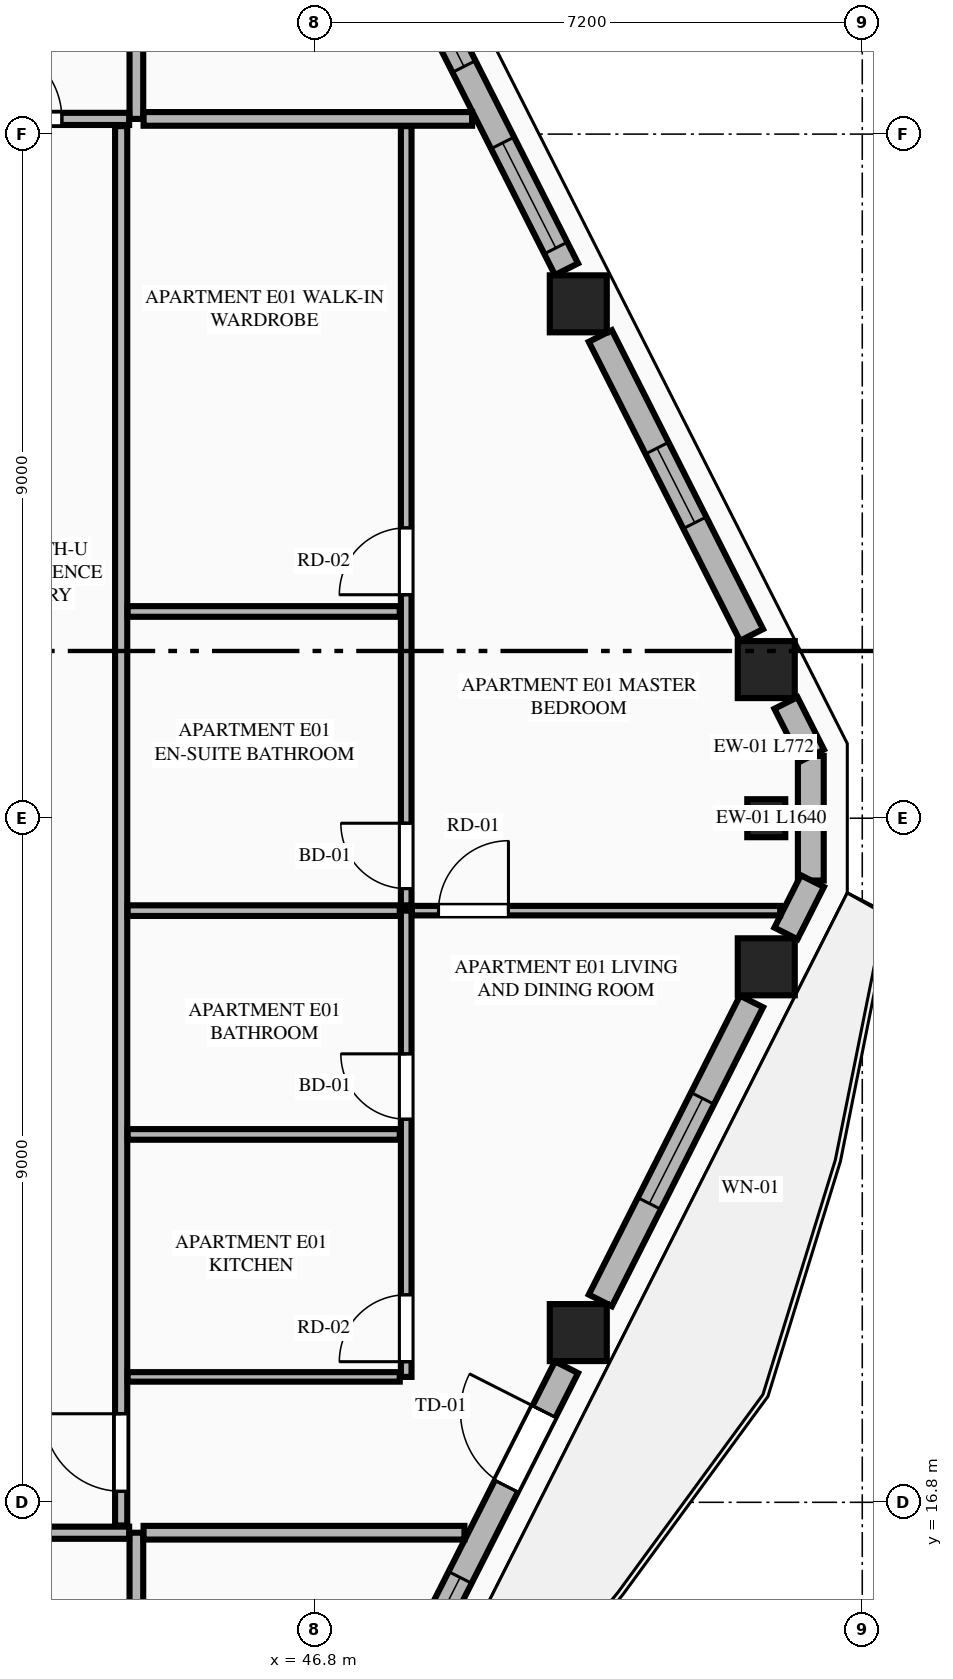
"""IFC4 building model, lengths in metres.
Left out: names, types, materials, properties, quantities, classifications, styles, units other than length and angle.
Written with IfcOpenShell. Run it as: python <this file> out.ifc"""

import sys

from ifc_helpers import new_model, si_unit, direction, frame, frame_2d, origin, origin_2d, place, context, subcontext, project, spatial, rectangle, extrude, element, fill, save


model = new_model("IFC4")
c1 = context("Model", 3, precision=1e-05, world=origin(), true_north=direction((0.0, 1.0)))
c2 = subcontext(c1, "Body", "Model", "MODEL_VIEW")
j1 = project(units=[si_unit("LENGTHUNIT", "METRE"), si_unit("PLANEANGLEUNIT", "RADIAN")], contexts=[c1])
p1 = place(None, origin())
s1 = spatial("IfcSite", under=j1, at=p1, CompositionType="ELEMENT")
p2 = place(p1, origin())
s2 = spatial("IfcBuilding", under=s1, at=p2, CompositionType="ELEMENT")
p3 = place(p2, frame((0.0, 0.0, 234.3)))
s3 = spatial("IfcBuildingStorey", under=s2, at=p3, CompositionType="ELEMENT", Elevation=234.3)
for number, where, z_axis, x_axis in (
    (1, (50.264, 19.033, 0.0), (0.0, 0.0, 1.0), (1.0, 0.0, 0.0)),
    (2, (52.737, 23.845, 0.0), (0.0, 0.0, 1.0), (1.0, 0.0, 0.0)),
    (3, (52.737, 27.755, 0.0), (0.0, 0.0, 1.0), (1.0, 0.0, 0.0)),
    (4, (50.264, 32.567, 0.0), (0.0, 0.0, 1.0), (1.0, 0.0, 0.0)),
):
    element("IfcColumn", number, at=place(p3, frame(where, z_axis=z_axis, x_axis=x_axis)), inside=s3, PredefinedType="COLUMN", context=c2, shape_type="SweptSolid", body=[
        extrude(rectangle(XDim=0.75, YDim=0.75, at=origin_2d()), origin(), (0.0, 0.0, 1.0), 3.65),
    ])
p4 = place(p3, frame((52.737, 25.8, 0.0), z_axis=(0.0, 0.0, 1.0), x_axis=(0.0, 1.0, 0.0)))
e5 = element("IfcColumn", 5, at=p4, inside=s3, PredefinedType="PILASTER", context=c2, shape_type="SweptSolid", body=[
    extrude(rectangle(XDim=0.5, YDim=0.35, at=origin_2d()), origin(), (0.0, 0.0, 1.0), 3.65),
])
p5 = place(p3, frame((53.323, 24.98, 0.0), z_axis=(0.0, 0.0, 1.0), x_axis=(0.0, 1.0, 0.0)))
e6 = element("IfcWall", 6, at=p5, inside=s3, PredefinedType="STANDARD", context=c2, shape_type="SweptSolid", body=[
    extrude(rectangle(XDim=1.64, YDim=0.34, at=frame_2d((0.82, 0.0))), origin(), (0.0, 0.0, 1.0), 3.45),
])
p6 = place(p3, frame((48.032, 14.473, 0.0), z_axis=(0.0, 0.0, 1.0), x_axis=(0.451539564999, 0.892251097641, 0.0)))
e7 = element("IfcWall", 7, at=p6, inside=s3, PredefinedType="STANDARD", context=c2, shape_type="SweptSolid", body=[
    extrude(rectangle(XDim=4.6, YDim=0.34, at=frame_2d((2.3, 0.0))), origin(), (0.0, 0.0, 1.0), 2.983),
])
p7 = place(p6, frame((2.846, 0.0, 0.0)))
e8 = element("IfcOpeningElement", 8, at=p7, cuts=e7, PredefinedType="OPENING", context=c2, shape_type="SweptSolid", body=[
    extrude(rectangle(XDim=1.1, YDim=2.25, at=frame_2d((0.55, 1.125))), frame((0.0, 0.18, 0.0), z_axis=(0.0, -1.0, 0.0), x_axis=(1.0, 0.0, 0.0)), (0.0, 0.0, 1.0), 0.36),
])
p8 = place(p6, frame((0.4, 0.0, 0.75)))
e9 = element("IfcOpeningElement", 9, at=p8, cuts=e7, PredefinedType="OPENING", context=c2, shape_type="SweptSolid", body=[
    extrude(rectangle(XDim=1.1, YDim=2.0, at=frame_2d((0.55, 1.0))), frame((0.0, 0.18, 0.0), z_axis=(0.0, -1.0, 0.0), x_axis=(1.0, 0.0, 0.0)), (0.0, 0.0, 1.0), 0.36),
])
p9 = place(p3, frame((50.554, 19.456, 0.0), z_axis=(0.0, 0.0, 1.0), x_axis=(0.45130817501, 0.892368158984, 0.0)))
e10 = element("IfcWall", 10, at=p9, inside=s3, PredefinedType="STANDARD", context=c2, shape_type="SweptSolid", body=[
    extrude(rectangle(XDim=4.407, YDim=0.34, at=frame_2d((2.204, 0.0))), origin(), (0.0, 0.0, 1.0), 2.983),
])
p10 = place(p9, frame((1.429, 0.0, 0.75)))
e11 = element("IfcOpeningElement", 11, at=p10, cuts=e10, PredefinedType="OPENING", context=c2, shape_type="SweptSolid", body=[
    extrude(rectangle(XDim=1.55, YDim=2.05, at=frame_2d((0.775, 1.025))), frame((0.0, 0.18, 0.0), z_axis=(0.0, -1.0, 0.0), x_axis=(1.0, 0.0, 0.0)), (0.0, 0.0, 1.0), 0.36),
])
for number, where, z_axis, x_axis in (
    (12, (52.996, 24.284, 0.0), (0.0, 0.0, 1.0), (0.451, 0.893, 0.0)),
    (13, (53.344, 26.627, 0.0), (0.0, 0.0, 1.0), (-0.451, 0.893, 0.0)),
):
    element("IfcWall", number, at=place(p3, frame(where, z_axis=z_axis, x_axis=x_axis)), inside=s3, PredefinedType="STANDARD", context=c2, shape_type="SweptSolid", body=[
        extrude(rectangle(XDim=0.772, YDim=0.34, at=frame_2d((0.386, 0.0))), origin(), (0.0, 0.0, 1.0), 3.45),
    ])
p11 = place(p3, frame((52.543, 28.211, 0.0), z_axis=(0.0, 0.0, 1.0), x_axis=(-0.451285866323, 0.892379441077, 0.0)))
e14 = element("IfcWall", 14, at=p11, inside=s3, PredefinedType="STANDARD", context=c2, shape_type="SweptSolid", body=[
    extrude(rectangle(XDim=4.407, YDim=0.34, at=frame_2d((2.204, 0.0))), origin(), (0.0, 0.0, 1.0), 2.983),
])
p12 = place(p11, frame((1.654, 0.0, 0.75)))
e15 = element("IfcOpeningElement", 15, at=p12, cuts=e14, PredefinedType="OPENING", context=c2, shape_type="SweptSolid", body=[
    extrude(rectangle(XDim=1.1, YDim=2.0, at=frame_2d((0.55, 1.0))), frame((0.0, 0.18, 0.0), z_axis=(0.0, -1.0, 0.0), x_axis=(1.0, 0.0, 0.0)), (0.0, 0.0, 1.0), 0.36),
])
p13 = place(p3, frame((50.109, 33.023, 0.0), z_axis=(0.0, 0.0, 1.0), x_axis=(-0.451539564999, 0.892251097641, 0.0)))
e16 = element("IfcWall", 16, at=p13, inside=s3, PredefinedType="STANDARD", context=c2, shape_type="SweptSolid", body=[
    extrude(rectangle(XDim=4.6, YDim=0.34, at=frame_2d((2.3, 0.0))), origin(), (0.0, 0.0, 1.0), 2.983),
])
p14 = place(p13, frame((0.312, 0.0, 0.75)))
e17 = element("IfcOpeningElement", 17, at=p14, cuts=e16, PredefinedType="OPENING", context=c2, shape_type="SweptSolid", body=[
    extrude(rectangle(XDim=1.55, YDim=2.05, at=frame_2d((0.775, 1.025))), frame((0.0, 0.18, 0.0), z_axis=(0.0, -1.0, 0.0), x_axis=(1.0, 0.0, 0.0)), (0.0, 0.0, 1.0), 0.36),
])
p15 = place(p13, frame((2.988, 0.0, 0.75)))
e18 = element("IfcOpeningElement", 18, at=p15, cuts=e16, PredefinedType="OPENING", context=c2, shape_type="SweptSolid", body=[
    extrude(rectangle(XDim=1.1, YDim=2.0, at=frame_2d((0.55, 1.0))), frame((0.0, 0.18, 0.0), z_axis=(0.0, -1.0, 0.0), x_axis=(1.0, 0.0, 0.0)), (0.0, 0.0, 1.0), 0.36),
])
p16 = place(p3, frame((44.45, 8.119, 0.0), z_axis=(0.0, 0.0, 1.0), x_axis=(0.0, 1.0, 0.0)))
e19 = element("IfcWall", 19, at=p16, inside=s3, PredefinedType="PARTITIONING", context=c2, shape_type="SweptSolid", body=[
    extrude(rectangle(XDim=8.281, YDim=0.18, at=frame_2d((4.141, 0.0))), origin(), (0.0, 0.0, 1.0), 3.45),
])
p17 = place(p3, frame((29.241, 16.4, 0.0), z_axis=(0.0, 0.0, 1.0), x_axis=(1.0, 0.0, 0.0)))
e20 = element("IfcWall", 20, at=p17, inside=s3, PredefinedType="PARTITIONING", context=c2, shape_type="SweptSolid", body=[
    extrude(rectangle(XDim=15.114, YDim=0.16, at=frame_2d((7.557, 0.0))), origin(), (0.0, 0.0, 1.0), 3.45),
])
p18 = place(p17, frame((12.909, 0.0, 0.0)))
e21 = element("IfcOpeningElement", 21, at=p18, cuts=e20, PredefinedType="OPENING", context=c2, shape_type="SweptSolid", body=[
    extrude(rectangle(XDim=1.02, YDim=2.25, at=frame_2d((0.51, 1.125))), frame((0.0, 0.09, 0.0), z_axis=(0.0, -1.0, 0.0), x_axis=(1.0, 0.0, 0.0)), (0.0, 0.0, 1.0), 0.18),
])
p19 = place(p3, frame((44.45, 35.0, 0.0), z_axis=(0.0, 0.0, 1.0), x_axis=(0.0, 1.0, 0.0)))
e22 = element("IfcWall", 22, at=p19, inside=s3, PredefinedType="PARTITIONING", context=c2, shape_type="SweptSolid", body=[
    extrude(rectangle(XDim=8.481, YDim=0.18, at=frame_2d((4.24, 0.0))), origin(), (0.0, 0.0, 1.0), 3.45),
])
p20 = place(p3, frame((29.241, 35.0, 0.0), z_axis=(0.0, 0.0, 1.0), x_axis=(1.0, 0.0, 0.0)))
e23 = element("IfcWall", 23, at=p20, inside=s3, PredefinedType="PARTITIONING", context=c2, shape_type="SweptSolid", body=[
    extrude(rectangle(XDim=15.114, YDim=0.16, at=frame_2d((7.557, 0.0))), origin(), (0.0, 0.0, 1.0), 3.45),
])
p21 = place(p20, frame((13.209, 0.0, 0.0)))
e24 = element("IfcOpeningElement", 24, at=p21, cuts=e23, PredefinedType="OPENING", context=c2, shape_type="SweptSolid", body=[
    extrude(rectangle(XDim=1.02, YDim=2.25, at=frame_2d((0.51, 1.125))), frame((0.0, 0.09, 0.0), z_axis=(0.0, -1.0, 0.0), x_axis=(1.0, 0.0, 0.0)), (0.0, 0.0, 1.0), 0.18),
])
p22 = place(p3, frame((44.545, 16.4, 0.0), z_axis=(0.0, 0.0, 1.0), x_axis=(1.0, 0.0, 0.0)))
e25 = element("IfcWall", 25, at=p22, inside=s3, PredefinedType="PARTITIONING", context=c2, shape_type="SweptSolid", body=[
    extrude(rectangle(XDim=4.221, YDim=0.18, at=frame_2d((2.111, 0.0))), origin(), (0.0, 0.0, 1.0), 3.45),
])
p23 = place(p3, frame((44.545, 35.0, 0.0), z_axis=(0.0, 0.0, 1.0), x_axis=(1.0, 0.0, 0.0)))
e26 = element("IfcWall", 26, at=p23, inside=s3, PredefinedType="PARTITIONING", context=c2, shape_type="SweptSolid", body=[
    extrude(rectangle(XDim=4.322, YDim=0.18, at=frame_2d((2.161, 0.0))), origin(), (0.0, 0.0, 1.0), 3.45),
])
p24 = place(p3, frame((44.25, 16.495, 0.0), z_axis=(0.0, 0.0, 1.0), x_axis=(0.0, 1.0, 0.0)))
e27 = element("IfcWall", 27, at=p24, inside=s3, PredefinedType="PARTITIONING", context=c2, shape_type="SweptSolid", body=[
    extrude(rectangle(XDim=18.41, YDim=0.16, at=frame_2d((9.205, 0.0))), origin(), (0.0, 0.0, 1.0), 3.137),
])
p25 = place(p24, frame((0.45, 0.0, 0.0)))
e28 = element("IfcOpeningElement", 28, at=p25, cuts=e27, PredefinedType="OPENING", context=c2, shape_type="SweptSolid", body=[
    extrude(rectangle(XDim=1.02, YDim=2.25, at=frame_2d((0.51, 1.125))), frame((0.0, 0.09, 0.0), z_axis=(0.0, -1.0, 0.0), x_axis=(1.0, 0.0, 0.0)), (0.0, 0.0, 1.0), 0.18),
])
p26 = place(p3, frame((44.335, 18.45, 0.0), z_axis=(0.0, 0.0, 1.0), x_axis=(1.0, 0.0, 0.0)))
e29 = element("IfcWall", 29, at=p26, inside=s3, PredefinedType="PARTITIONING", context=c2, shape_type="SweptSolid", body=[
    extrude(rectangle(XDim=3.58, YDim=0.125, at=frame_2d((1.79, 0.0))), origin(), (0.0, 0.0, 1.0), 3.45),
])
p27 = place(p3, frame((48.0, 18.45, 0.0), z_axis=(0.0, 0.0, 1.0), x_axis=(0.0, 1.0, 0.0)))
e30 = element("IfcWall", 30, at=p27, inside=s3, PredefinedType="PLUMBINGWALL", context=c2, shape_type="SweptSolid", body=[
    extrude(rectangle(XDim=6.134, YDim=0.14, at=frame_2d((3.067, 0.0))), origin(), (0.0, 0.0, 1.0), 3.45),
])
p28 = place(p27, frame((0.2, 0.0, 0.0)))
e31 = element("IfcOpeningElement", 31, at=p28, cuts=e30, PredefinedType="OPENING", context=c2, shape_type="SweptSolid", body=[
    extrude(rectangle(XDim=0.88, YDim=2.15, at=frame_2d((0.44, 1.075))), frame((0.0, 0.08, 0.0), z_axis=(0.0, -1.0, 0.0), x_axis=(1.0, 0.0, 0.0)), (0.0, 0.0, 1.0), 0.16),
])
p29 = place(p27, frame((3.39, 0.0, 0.0)))
e32 = element("IfcOpeningElement", 32, at=p29, cuts=e30, PredefinedType="OPENING", context=c2, shape_type="SweptSolid", body=[
    extrude(rectangle(XDim=0.86, YDim=2.1, at=frame_2d((0.43, 1.05))), frame((0.0, 0.08, 0.0), z_axis=(0.0, -1.0, 0.0), x_axis=(1.0, 0.0, 0.0)), (0.0, 0.0, 1.0), 0.16),
])
p30 = place(p3, frame((48.0, 24.654, 0.0), z_axis=(0.0, 0.0, 1.0), x_axis=(0.0, 1.0, 0.0)))
e33 = element("IfcWall", 33, at=p30, inside=s3, PredefinedType="PLUMBINGWALL", context=c2, shape_type="SweptSolid", body=[
    extrude(rectangle(XDim=10.251, YDim=0.14, at=frame_2d((5.125, 0.0))), origin(), (0.0, 0.0, 1.0), 3.45),
])
p31 = place(p30, frame((0.22, 0.0, 0.0)))
e34 = element("IfcOpeningElement", 34, at=p31, cuts=e33, PredefinedType="OPENING", context=c2, shape_type="SweptSolid", body=[
    extrude(rectangle(XDim=0.86, YDim=2.1, at=frame_2d((0.43, 1.05))), frame((0.0, 0.08, 0.0), z_axis=(0.0, -1.0, 0.0), x_axis=(1.0, 0.0, 0.0)), (0.0, 0.0, 1.0), 0.16),
])
p32 = place(p30, frame((4.086, 0.0, 0.0)))
e35 = element("IfcOpeningElement", 35, at=p32, cuts=e33, PredefinedType="OPENING", context=c2, shape_type="SweptSolid", body=[
    extrude(rectangle(XDim=0.88, YDim=2.15, at=frame_2d((0.44, 1.075))), frame((0.0, 0.08, 0.0), z_axis=(0.0, -1.0, 0.0), x_axis=(1.0, 0.0, 0.0)), (0.0, 0.0, 1.0), 0.16),
])
p33 = place(p3, frame((44.335, 24.584, 0.0), z_axis=(0.0, 0.0, 1.0), x_axis=(1.0, 0.0, 0.0)))
e36 = element("IfcWall", 36, at=p33, inside=s3, PredefinedType="PLUMBINGWALL", context=c2, shape_type="SweptSolid", body=[
    extrude(rectangle(XDim=3.58, YDim=0.14, at=frame_2d((1.79, 0.0))), origin(), (0.0, 0.0, 1.0), 3.45),
])
p34 = place(p3, frame((48.075, 24.584, 0.0), z_axis=(0.0, 0.0, 1.0), x_axis=(1.0, 0.0, 0.0)))
e37 = element("IfcWall", 37, at=p34, inside=s3, PredefinedType="PARTITIONING", context=c2, shape_type="SweptSolid", body=[
    extrude(rectangle(XDim=4.845, YDim=0.125, at=frame_2d((2.422, 0.0))), origin(), (0.0, 0.0, 1.0), 3.45),
])
p35 = place(p34, frame((0.35, 0.0, 0.0)))
e38 = element("IfcOpeningElement", 38, at=p35, cuts=e37, PredefinedType="OPENING", context=c2, shape_type="SweptSolid", body=[
    extrude(rectangle(XDim=0.92, YDim=2.15, at=frame_2d((0.46, 1.075))), frame((0.0, 0.073, 0.0), z_axis=(0.0, -1.0, 0.0), x_axis=(1.0, 0.0, 0.0)), (0.0, 0.0, 1.0), 0.145),
])
for number, where, z_axis, x_axis in (
    (39, (44.335, 21.64, 0.0), (0.0, 0.0, 1.0), (1.0, 0.0, 0.0)),
    (40, (44.335, 28.52, 0.0), (0.0, 0.0, 1.0), (1.0, 0.0, 0.0)),
):
    element("IfcWall", number, at=place(p3, frame(where, z_axis=z_axis, x_axis=x_axis)), inside=s3, PredefinedType="PLUMBINGWALL", context=c2, shape_type="SweptSolid", body=[
        extrude(rectangle(XDim=3.58, YDim=0.14, at=frame_2d((1.79, 0.0))), origin(), (0.0, 0.0, 1.0), 3.45),
    ])
p36 = place(p7, origin())
e41 = element("IfcDoor", 41, at=p36, inside=s3, OperationType="SINGLE_SWING_RIGHT", PredefinedType="DOOR", context=c2, shape_type="SweptSolid", body=[
    extrude(rectangle(XDim=1.1, YDim=2.25, at=frame_2d((0.55, 1.125))), frame((0.0, 0.025, 0.0), z_axis=(0.0, -1.0, 0.0), x_axis=(1.0, 0.0, 0.0)), (0.0, 0.0, 1.0), 0.05),
])
fill(e8, e41)
p37 = place(p10, origin())
e42 = element("IfcWindow", 42, at=p37, inside=s3, PartitioningType="SINGLE_PANEL", PredefinedType="WINDOW", context=c2, shape_type="SweptSolid", body=[
    extrude(rectangle(XDim=1.55, YDim=2.05, at=frame_2d((0.775, 1.025))), frame((0.0, 0.03, 0.0), z_axis=(0.0, -1.0, 0.0), x_axis=(1.0, 0.0, 0.0)), (0.0, 0.0, 1.0), 0.06),
])
fill(e11, e42)
p38 = place(p12, origin())
e43 = element("IfcWindow", 43, at=p38, inside=s3, PartitioningType="SINGLE_PANEL", PredefinedType="WINDOW", context=c2, shape_type="SweptSolid", body=[
    extrude(rectangle(XDim=1.1, YDim=2.0, at=frame_2d((0.55, 1.0))), frame((0.0, 0.03, 0.0), z_axis=(0.0, -1.0, 0.0), x_axis=(1.0, 0.0, 0.0)), (0.0, 0.0, 1.0), 0.06),
])
fill(e15, e43)
p39 = place(p14, origin())
e44 = element("IfcWindow", 44, at=p39, inside=s3, PartitioningType="SINGLE_PANEL", PredefinedType="WINDOW", context=c2, shape_type="SweptSolid", body=[
    extrude(rectangle(XDim=1.55, YDim=2.05, at=frame_2d((0.775, 1.025))), frame((0.0, 0.03, 0.0), z_axis=(0.0, -1.0, 0.0), x_axis=(1.0, 0.0, 0.0)), (0.0, 0.0, 1.0), 0.06),
])
fill(e17, e44)
p40 = place(p21, origin())
e45 = element("IfcDoor", 45, at=p40, inside=s3, OperationType="SINGLE_SWING_LEFT", PredefinedType="DOOR", context=c2, shape_type="SweptSolid", body=[
    extrude(rectangle(XDim=1.02, YDim=2.25, at=frame_2d((0.51, 1.125))), frame((0.0, 0.025, 0.0), z_axis=(0.0, -1.0, 0.0), x_axis=(1.0, 0.0, 0.0)), (0.0, 0.0, 1.0), 0.05),
])
fill(e24, e45)
p41 = place(p28, origin())
e46 = element("IfcDoor", 46, at=p41, inside=s3, OperationType="SINGLE_SWING_LEFT", PredefinedType="DOOR", context=c2, shape_type="SweptSolid", body=[
    extrude(rectangle(XDim=0.88, YDim=2.15, at=frame_2d((0.44, 1.075))), frame((0.0, 0.025, 0.0), z_axis=(0.0, -1.0, 0.0), x_axis=(1.0, 0.0, 0.0)), (0.0, 0.0, 1.0), 0.05),
])
fill(e31, e46)
p42 = place(p29, origin())
e47 = element("IfcDoor", 47, at=p42, inside=s3, OperationType="SINGLE_SWING_RIGHT", PredefinedType="DOOR", context=c2, shape_type="SweptSolid", body=[
    extrude(rectangle(XDim=0.86, YDim=2.1, at=frame_2d((0.43, 1.05))), frame((0.0, 0.025, 0.0), z_axis=(0.0, -1.0, 0.0), x_axis=(1.0, 0.0, 0.0)), (0.0, 0.0, 1.0), 0.05),
])
fill(e32, e47)
p43 = place(p31, origin())
e48 = element("IfcDoor", 48, at=p43, inside=s3, OperationType="SINGLE_SWING_RIGHT", PredefinedType="DOOR", context=c2, shape_type="SweptSolid", body=[
    extrude(rectangle(XDim=0.86, YDim=2.1, at=frame_2d((0.43, 1.05))), frame((0.0, 0.025, 0.0), z_axis=(0.0, -1.0, 0.0), x_axis=(1.0, 0.0, 0.0)), (0.0, 0.0, 1.0), 0.05),
])
fill(e34, e48)
p44 = place(p32, origin())
e49 = element("IfcDoor", 49, at=p44, inside=s3, OperationType="SINGLE_SWING_LEFT", PredefinedType="DOOR", context=c2, shape_type="SweptSolid", body=[
    extrude(rectangle(XDim=0.88, YDim=2.15, at=frame_2d((0.44, 1.075))), frame((0.0, 0.025, 0.0), z_axis=(0.0, -1.0, 0.0), x_axis=(1.0, 0.0, 0.0)), (0.0, 0.0, 1.0), 0.05),
])
fill(e35, e49)
p45 = place(p25, origin())
e50 = element("IfcDoor", 50, at=p45, inside=s3, OperationType="SINGLE_SWING_RIGHT", PredefinedType="DOOR", context=c2, shape_type="SweptSolid", body=[
    extrude(rectangle(XDim=1.02, YDim=2.25, at=frame_2d((0.51, 1.125))), frame((0.0, 0.025, 0.0), z_axis=(0.0, -1.0, 0.0), x_axis=(1.0, 0.0, 0.0)), (0.0, 0.0, 1.0), 0.05),
])
fill(e28, e50)
p46 = place(p35, origin())
e51 = element("IfcDoor", 51, at=p46, inside=s3, OperationType="SINGLE_SWING_RIGHT", PredefinedType="DOOR", context=c2, shape_type="SweptSolid", body=[
    extrude(rectangle(XDim=0.92, YDim=2.15, at=frame_2d((0.46, 1.075))), frame((0.0, 0.025, 0.0), z_axis=(0.0, -1.0, 0.0), x_axis=(1.0, 0.0, 0.0)), (0.0, 0.0, 1.0), 0.05),
])
fill(e38, e51)
p47 = place(p8, origin())
e52 = element("IfcWindow", 52, at=p47, inside=s3, PartitioningType="SINGLE_PANEL", PredefinedType="WINDOW", context=c2, shape_type="SweptSolid", body=[
    extrude(rectangle(XDim=1.1, YDim=2.0, at=frame_2d((0.55, 1.0))), frame((0.0, 0.03, 0.0), z_axis=(0.0, -1.0, 0.0), x_axis=(1.0, 0.0, 0.0)), (0.0, 0.0, 1.0), 0.06),
])
fill(e9, e52)
p48 = place(p15, origin())
e53 = element("IfcWindow", 53, at=p48, inside=s3, PartitioningType="SINGLE_PANEL", PredefinedType="WINDOW", context=c2, shape_type="SweptSolid", body=[
    extrude(rectangle(XDim=1.1, YDim=2.0, at=frame_2d((0.55, 1.0))), frame((0.0, 0.03, 0.0), z_axis=(0.0, -1.0, 0.0), x_axis=(1.0, 0.0, 0.0)), (0.0, 0.0, 1.0), 0.06),
])
fill(e18, e53)
save(model, sys.argv[1])
